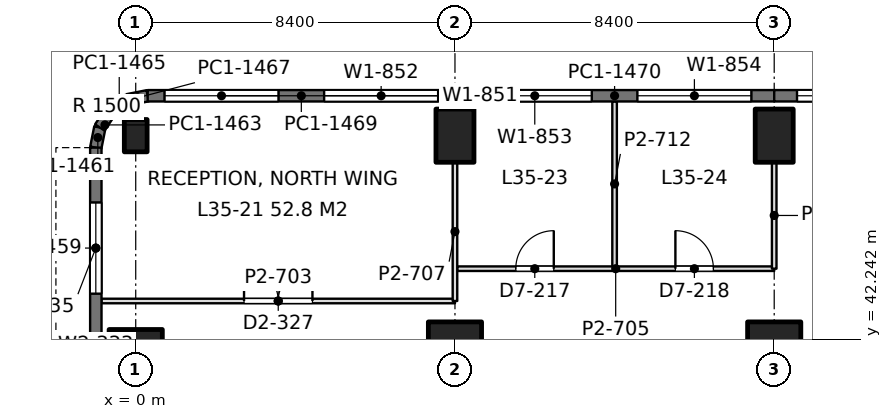
"""IFC4 building model, lengths in metres.
Left out: names, types, materials, properties, quantities, classifications, styles, units other than length and angle.
Written with IfcOpenShell. Run it as: python <this file> out.ifc"""

import sys

from ifc_helpers import new_model, si_unit, direction, frame, frame_2d, origin, origin_2d, place, context, subcontext, project, spatial, rectangle, extrude, element, fill, save


model = new_model("IFC4")
c1 = context("Model", 3, precision=1e-05, world=origin(), true_north=direction((0.0, 1.0)))
c2 = subcontext(c1, "Body", "Model", "MODEL_VIEW")
j1 = project(units=[si_unit("LENGTHUNIT", "METRE"), si_unit("PLANEANGLEUNIT", "RADIAN")], contexts=[c1])
p1 = place(None, origin())
s1 = spatial("IfcSite", under=j1, at=p1, CompositionType="ELEMENT")
p2 = place(p1, origin())
s2 = spatial("IfcBuilding", under=s1, at=p2, CompositionType="ELEMENT")
p3 = place(p2, frame((0.0, 0.0, 155.4)))
s3 = spatial("IfcBuildingStorey", under=s2, at=p3, CompositionType="ELEMENT", Elevation=155.4)
p4 = place(p3, frame((0.0, 42.0, 0.0), z_axis=(0.0, 0.0, 1.0), x_axis=(0.0, 1.0, 0.0)))
e1 = element("IfcColumn", 1, at=p4, inside=s3, PredefinedType="COLUMN", context=c2, shape_type="SweptSolid", body=[
    extrude(rectangle(XDim=1.0, YDim=1.4, at=origin_2d()), origin(), (0.0, 0.0, 1.0), 4.2),
])
p5 = place(p3, frame((0.0, 47.6, 0.0), z_axis=(0.0, 0.0, 1.0), x_axis=(1.0, 0.0, 0.0)))
e2 = element("IfcColumn", 2, at=p5, inside=s3, PredefinedType="COLUMN", context=c2, shape_type="SweptSolid", body=[
    extrude(rectangle(XDim=0.6, YDim=0.85, at=origin_2d()), origin(), (0.0, 0.0, 1.0), 4.2),
])
p6 = place(p3, frame((8.4, 42.0, 0.0), z_axis=(0.0, 0.0, 1.0), x_axis=(1.0, 0.0, 0.0)))
e3 = element("IfcColumn", 3, at=p6, inside=s3, PredefinedType="COLUMN", context=c2, shape_type="SweptSolid", body=[
    extrude(rectangle(XDim=1.4, YDim=1.4, at=origin_2d()), origin(), (0.0, 0.0, 1.0), 4.2),
])
p7 = place(p3, frame((8.4, 47.6, 0.0), z_axis=(0.0, 0.0, 1.0), x_axis=(1.0, 0.0, 0.0)))
e4 = element("IfcColumn", 4, at=p7, inside=s3, PredefinedType="COLUMN", context=c2, shape_type="SweptSolid", body=[
    extrude(rectangle(XDim=1.0, YDim=1.4, at=origin_2d()), origin(), (0.0, 0.0, 1.0), 4.2),
])
p8 = place(p3, frame((16.8, 42.0, 0.0), z_axis=(0.0, 0.0, 1.0), x_axis=(1.0, 0.0, 0.0)))
e5 = element("IfcColumn", 5, at=p8, inside=s3, PredefinedType="COLUMN", context=c2, shape_type="SweptSolid", body=[
    extrude(rectangle(XDim=1.4, YDim=1.4, at=origin_2d()), origin(), (0.0, 0.0, 1.0), 4.2),
])
p9 = place(p3, frame((16.8, 47.6, 0.0), z_axis=(0.0, 0.0, 1.0), x_axis=(1.0, 0.0, 0.0)))
e6 = element("IfcColumn", 6, at=p9, inside=s3, PredefinedType="COLUMN", context=c2, shape_type="SweptSolid", body=[
    extrude(rectangle(XDim=1.0, YDim=1.4, at=origin_2d()), origin(), (0.0, 0.0, 1.0), 4.2),
])
p10 = place(p3, frame((-1.05, 42.0, 0.0), z_axis=(0.0, 0.0, 1.0), x_axis=(0.0, 1.0, 0.0)))
e7 = element("IfcWall", 7, at=p10, inside=s3, PredefinedType="SOLIDWALL", context=c2, shape_type="SweptSolid", body=[
    extrude(rectangle(XDim=5.285, YDim=0.3, at=frame_2d((2.643, 0.0))), origin(), (0.0, 0.0, 1.0), 4.05),
])
p11 = place(p10, frame((1.443, 0.0, 0.9)))
e8 = element("IfcOpeningElement", 8, at=p11, cuts=e7, PredefinedType="OPENING", context=c2, shape_type="SweptSolid", body=[
    extrude(rectangle(XDim=2.4, YDim=1.9, at=frame_2d((1.2, 0.95))), frame((0.0, 0.16, 0.0), z_axis=(0.0, -1.0, 0.0), x_axis=(1.0, 0.0, 0.0)), (0.0, 0.0, 1.0), 0.32),
])
p12 = place(p3, frame((-1.05, 47.285, 0.0), z_axis=(0.0, 0.0, 1.0), x_axis=(0.195073962632, 0.980788534345, 0.0)))
e9 = element("IfcWall", 9, at=p12, inside=s3, PredefinedType="SOLIDWALL", context=c2, shape_type="SweptSolid", body=[
    extrude(rectangle(XDim=0.541, YDim=0.3, at=frame_2d((0.271, 0.0))), origin(), (0.0, 0.0, 1.0), 4.05),
])
p13 = place(p3, frame((-0.945, 47.815, 0.0), z_axis=(0.0, 0.0, 1.0), x_axis=(0.55534295404, 0.831621430339, 0.0)))
e10 = element("IfcWall", 10, at=p13, inside=s3, PredefinedType="SOLIDWALL", context=c2, shape_type="SweptSolid", body=[
    extrude(rectangle(XDim=0.526, YDim=0.3, at=frame_2d((0.263, 0.0))), origin(), (0.0, 0.0, 1.0), 4.05),
])
p14 = place(p3, frame((-0.653, 48.253, 0.0), z_axis=(0.0, 0.0, 1.0), x_axis=(0.831692711774, 0.555236195849, 0.0)))
e11 = element("IfcWall", 11, at=p14, inside=s3, PredefinedType="SOLIDWALL", context=c2, shape_type="SweptSolid", body=[
    extrude(rectangle(XDim=0.525, YDim=0.3, at=frame_2d((0.263, 0.0))), origin(), (0.0, 0.0, 1.0), 4.05),
])
p15 = place(p3, frame((-0.216, 48.544, 0.0), z_axis=(0.0, 0.0, 1.0), x_axis=(0.980788534345, 0.195073962632, 0.0)))
e12 = element("IfcWall", 12, at=p15, inside=s3, PredefinedType="SOLIDWALL", context=c2, shape_type="SweptSolid", body=[
    extrude(rectangle(XDim=0.541, YDim=0.3, at=frame_2d((0.271, 0.0))), origin(), (0.0, 0.0, 1.0), 4.05),
])
p16 = place(p3, frame((0.315, 48.65, 0.0), z_axis=(0.0, 0.0, 1.0), x_axis=(1.0, 0.0, 0.0)))
e13 = element("IfcWall", 13, at=p16, inside=s3, PredefinedType="SOLIDWALL", context=c2, shape_type="SweptSolid", body=[
    extrude(rectangle(XDim=8.085, YDim=0.3, at=frame_2d((4.042, 0.0))), origin(), (0.0, 0.0, 1.0), 4.05),
])
p17 = place(p16, frame((0.443, 0.0, 0.9)))
e14 = element("IfcOpeningElement", 14, at=p17, cuts=e13, PredefinedType="OPENING", context=c2, shape_type="SweptSolid", body=[
    extrude(rectangle(XDim=3.0, YDim=1.9, at=frame_2d((1.5, 0.95))), frame((0.0, 0.16, 0.0), z_axis=(0.0, -1.0, 0.0), x_axis=(1.0, 0.0, 0.0)), (0.0, 0.0, 1.0), 0.32),
])
p18 = place(p16, frame((4.643, 0.0, 0.9)))
e15 = element("IfcOpeningElement", 15, at=p18, cuts=e13, PredefinedType="OPENING", context=c2, shape_type="SweptSolid", body=[
    extrude(rectangle(XDim=3.0, YDim=1.9, at=frame_2d((1.5, 0.95))), frame((0.0, 0.16, 0.0), z_axis=(0.0, -1.0, 0.0), x_axis=(1.0, 0.0, 0.0)), (0.0, 0.0, 1.0), 0.32),
])
p19 = place(p3, frame((8.4, 48.65, 0.0), z_axis=(0.0, 0.0, 1.0), x_axis=(1.0, 0.0, 0.0)))
e16 = element("IfcWall", 16, at=p19, inside=s3, PredefinedType="SOLIDWALL", context=c2, shape_type="SweptSolid", body=[
    extrude(rectangle(XDim=8.4, YDim=0.3, at=frame_2d((4.2, 0.0))), origin(), (0.0, 0.0, 1.0), 4.05),
])
p20 = place(p19, frame((0.6, 0.0, 0.9)))
e17 = element("IfcOpeningElement", 17, at=p20, cuts=e16, PredefinedType="OPENING", context=c2, shape_type="SweptSolid", body=[
    extrude(rectangle(XDim=3.0, YDim=1.9, at=frame_2d((1.5, 0.95))), frame((0.0, 0.16, 0.0), z_axis=(0.0, -1.0, 0.0), x_axis=(1.0, 0.0, 0.0)), (0.0, 0.0, 1.0), 0.32),
])
p21 = place(p19, frame((4.8, 0.0, 0.9)))
e18 = element("IfcOpeningElement", 18, at=p21, cuts=e16, PredefinedType="OPENING", context=c2, shape_type="SweptSolid", body=[
    extrude(rectangle(XDim=3.0, YDim=1.9, at=frame_2d((1.5, 0.95))), frame((0.0, 0.16, 0.0), z_axis=(0.0, -1.0, 0.0), x_axis=(1.0, 0.0, 0.0)), (0.0, 0.0, 1.0), 0.32),
])
p22 = place(p3, frame((16.8, 48.65, 0.0), z_axis=(0.0, 0.0, 1.0), x_axis=(1.0, 0.0, 0.0)))
e19 = element("IfcWall", 19, at=p22, inside=s3, PredefinedType="SOLIDWALL", context=c2, shape_type="SweptSolid", body=[
    extrude(rectangle(XDim=8.4, YDim=0.3, at=frame_2d((4.2, 0.0))), origin(), (0.0, 0.0, 1.0), 4.05),
])
p23 = place(p22, frame((0.6, 0.0, 0.9)))
e20 = element("IfcOpeningElement", 20, at=p23, cuts=e19, PredefinedType="OPENING", context=c2, shape_type="SweptSolid", body=[
    extrude(rectangle(XDim=3.0, YDim=1.9, at=frame_2d((1.5, 0.95))), frame((0.0, 0.16, 0.0), z_axis=(0.0, -1.0, 0.0), x_axis=(1.0, 0.0, 0.0)), (0.0, 0.0, 1.0), 0.32),
])
p24 = place(p22, frame((4.8, 0.0, 0.9)))
e21 = element("IfcOpeningElement", 21, at=p24, cuts=e19, PredefinedType="OPENING", context=c2, shape_type="SweptSolid", body=[
    extrude(rectangle(XDim=3.0, YDim=1.9, at=frame_2d((1.5, 0.95))), frame((0.0, 0.16, 0.0), z_axis=(0.0, -1.0, 0.0), x_axis=(1.0, 0.0, 0.0)), (0.0, 0.0, 1.0), 0.32),
])
p25 = place(p3, frame((-0.902, 43.25, 0.0), z_axis=(0.0, 0.0, 1.0), x_axis=(1.0, 0.0, 0.0)))
e22 = element("IfcWall", 22, at=p25, inside=s3, PredefinedType="PARTITIONING", context=c2, shape_type="SweptSolid", body=[
    extrude(rectangle(XDim=9.302, YDim=0.12, at=frame_2d((4.651, 0.0))), origin(), (0.0, 0.0, 1.0), 3.55),
])
p26 = place(p25, frame((3.752, 0.0, 0.0)))
e23 = element("IfcOpeningElement", 23, at=p26, cuts=e22, PredefinedType="OPENING", context=c2, shape_type="SweptSolid", body=[
    extrude(rectangle(XDim=1.8, YDim=2.2, at=frame_2d((0.9, 1.1))), frame((0.0, 0.07, 0.0), z_axis=(0.0, -1.0, 0.0), x_axis=(1.0, 0.0, 0.0)), (0.0, 0.0, 1.0), 0.14),
])
p27 = place(p3, frame((8.458, 44.1, 0.0), z_axis=(0.0, 0.0, 1.0), x_axis=(1.0, 0.0, 0.0)))
e24 = element("IfcWall", 24, at=p27, inside=s3, PredefinedType="PARTITIONING", context=c2, shape_type="SweptSolid", body=[
    extrude(rectangle(XDim=8.342, YDim=0.12, at=frame_2d((4.171, 0.0))), origin(), (0.0, 0.0, 1.0), 3.55),
])
p28 = place(p27, frame((1.542, 0.0, 0.0)))
e25 = element("IfcOpeningElement", 25, at=p28, cuts=e24, PredefinedType="OPENING", context=c2, shape_type="SweptSolid", body=[
    extrude(rectangle(XDim=1.0, YDim=2.4, at=frame_2d((0.5, 1.2))), frame((0.0, 0.07, 0.0), z_axis=(0.0, -1.0, 0.0), x_axis=(1.0, 0.0, 0.0)), (0.0, 0.0, 1.0), 0.14),
])
p29 = place(p27, frame((5.742, 0.0, 0.0)))
e26 = element("IfcOpeningElement", 26, at=p29, cuts=e24, PredefinedType="OPENING", context=c2, shape_type="SweptSolid", body=[
    extrude(rectangle(XDim=1.0, YDim=2.4, at=frame_2d((0.5, 1.2))), frame((0.0, 0.07, 0.0), z_axis=(0.0, -1.0, 0.0), x_axis=(1.0, 0.0, 0.0)), (0.0, 0.0, 1.0), 0.14),
])
p30 = place(p3, frame((8.4, 43.25, 0.0), z_axis=(0.0, 0.0, 1.0), x_axis=(0.0, 1.0, 0.0)))
e27 = element("IfcWall", 27, at=p30, inside=s3, PredefinedType="PARTITIONING", context=c2, shape_type="SweptSolid", body=[
    extrude(rectangle(XDim=3.651, YDim=0.12, at=frame_2d((1.825, 0.0))), origin(), (0.0, 0.0, 1.0), 3.55),
])
p31 = place(p3, frame((12.6, 44.158, 0.0), z_axis=(0.0, 0.0, 1.0), x_axis=(0.0, 1.0, 0.0)))
e28 = element("IfcWall", 28, at=p31, inside=s3, PredefinedType="PARTITIONING", context=c2, shape_type="SweptSolid", body=[
    extrude(rectangle(XDim=4.344, YDim=0.12, at=frame_2d((2.172, 0.0))), origin(), (0.0, 0.0, 1.0), 3.56),
])
p32 = place(p3, frame((16.8, 44.1, 0.0), z_axis=(0.0, 0.0, 1.0), x_axis=(0.0, 1.0, 0.0)))
e29 = element("IfcWall", 29, at=p32, inside=s3, PredefinedType="PARTITIONING", context=c2, shape_type="SweptSolid", body=[
    extrude(rectangle(XDim=2.801, YDim=0.12, at=frame_2d((1.4, 0.0))), origin(), (0.0, 0.0, 1.0), 3.55),
])
p33 = place(p11, origin())
e30 = element("IfcWindow", 30, at=p33, inside=s3, PartitioningType="SINGLE_PANEL", PredefinedType="WINDOW", context=c2, shape_type="SweptSolid", body=[
    extrude(rectangle(XDim=2.4, YDim=1.9, at=frame_2d((1.2, 0.95))), frame((0.0, 0.03, 0.0), z_axis=(0.0, -1.0, 0.0), x_axis=(1.0, 0.0, 0.0)), (0.0, 0.0, 1.0), 0.06),
])
fill(e8, e30)
p34 = place(p17, origin())
e31 = element("IfcWindow", 31, at=p34, inside=s3, PartitioningType="SINGLE_PANEL", PredefinedType="WINDOW", context=c2, shape_type="SweptSolid", body=[
    extrude(rectangle(XDim=3.0, YDim=1.9, at=frame_2d((1.5, 0.95))), frame((0.0, 0.03, 0.0), z_axis=(0.0, -1.0, 0.0), x_axis=(1.0, 0.0, 0.0)), (0.0, 0.0, 1.0), 0.06),
])
fill(e14, e31)
p35 = place(p18, origin())
e32 = element("IfcWindow", 32, at=p35, inside=s3, PartitioningType="SINGLE_PANEL", PredefinedType="WINDOW", context=c2, shape_type="SweptSolid", body=[
    extrude(rectangle(XDim=3.0, YDim=1.9, at=frame_2d((1.5, 0.95))), frame((0.0, 0.03, 0.0), z_axis=(0.0, -1.0, 0.0), x_axis=(1.0, 0.0, 0.0)), (0.0, 0.0, 1.0), 0.06),
])
fill(e15, e32)
p36 = place(p20, origin())
e33 = element("IfcWindow", 33, at=p36, inside=s3, PartitioningType="SINGLE_PANEL", PredefinedType="WINDOW", context=c2, shape_type="SweptSolid", body=[
    extrude(rectangle(XDim=3.0, YDim=1.9, at=frame_2d((1.5, 0.95))), frame((0.0, 0.03, 0.0), z_axis=(0.0, -1.0, 0.0), x_axis=(1.0, 0.0, 0.0)), (0.0, 0.0, 1.0), 0.06),
])
fill(e17, e33)
p37 = place(p21, origin())
e34 = element("IfcWindow", 34, at=p37, inside=s3, PartitioningType="SINGLE_PANEL", PredefinedType="WINDOW", context=c2, shape_type="SweptSolid", body=[
    extrude(rectangle(XDim=3.0, YDim=1.9, at=frame_2d((1.5, 0.95))), frame((0.0, 0.03, 0.0), z_axis=(0.0, -1.0, 0.0), x_axis=(1.0, 0.0, 0.0)), (0.0, 0.0, 1.0), 0.06),
])
fill(e18, e34)
p38 = place(p23, origin())
e35 = element("IfcWindow", 35, at=p38, inside=s3, PartitioningType="SINGLE_PANEL", PredefinedType="WINDOW", context=c2, shape_type="SweptSolid", body=[
    extrude(rectangle(XDim=3.0, YDim=1.9, at=frame_2d((1.5, 0.95))), frame((0.0, 0.03, 0.0), z_axis=(0.0, -1.0, 0.0), x_axis=(1.0, 0.0, 0.0)), (0.0, 0.0, 1.0), 0.06),
])
fill(e20, e35)
p39 = place(p26, origin())
e36 = element("IfcDoor", 36, at=p39, inside=s3, OperationType="DOUBLE_DOOR_SINGLE_SWING", PredefinedType="DOOR", context=c2, shape_type="SweptSolid", body=[
    extrude(rectangle(XDim=1.8, YDim=2.2, at=frame_2d((0.9, 1.1))), frame((0.0, 0.025, 0.0), z_axis=(0.0, -1.0, 0.0), x_axis=(1.0, 0.0, 0.0)), (0.0, 0.0, 1.0), 0.05),
])
fill(e23, e36)
p40 = place(p28, origin())
e37 = element("IfcDoor", 37, at=p40, inside=s3, OperationType="SINGLE_SWING_RIGHT", PredefinedType="DOOR", context=c2, shape_type="SweptSolid", body=[
    extrude(rectangle(XDim=1.0, YDim=2.4, at=frame_2d((0.5, 1.2))), frame((0.0, 0.025, 0.0), z_axis=(0.0, -1.0, 0.0), x_axis=(1.0, 0.0, 0.0)), (0.0, 0.0, 1.0), 0.05),
])
fill(e25, e37)
p41 = place(p29, origin())
e38 = element("IfcDoor", 38, at=p41, inside=s3, OperationType="SINGLE_SWING_LEFT", PredefinedType="DOOR", context=c2, shape_type="SweptSolid", body=[
    extrude(rectangle(XDim=1.0, YDim=2.4, at=frame_2d((0.5, 1.2))), frame((0.0, 0.025, 0.0), z_axis=(0.0, -1.0, 0.0), x_axis=(1.0, 0.0, 0.0)), (0.0, 0.0, 1.0), 0.05),
])
fill(e26, e38)
save(model, sys.argv[1])
